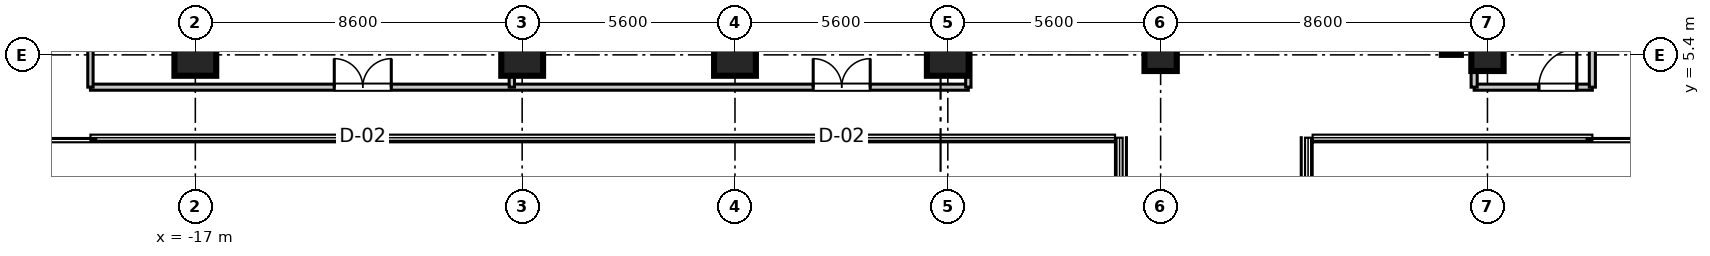
"""IFC4 building model, lengths in metres.
Left out: names, types, materials, properties, quantities, classifications, styles, units other than length and angle.
Written with IfcOpenShell. Run it as: python <this file> out.ifc"""

import sys

from ifc_helpers import new_model, si_unit, direction, frame, frame_2d, origin, origin_2d, place, context, subcontext, project, spatial, rectangle, extrude, source, transform, mapped, element, fill, save


model = new_model("IFC4")
c1 = context("Model", 3, precision=1e-05, world=origin(), true_north=direction((0.0, 1.0)))
c2 = subcontext(c1, "Body", "Model", "MODEL_VIEW")
j1 = project(units=[si_unit("LENGTHUNIT", "METRE"), si_unit("PLANEANGLEUNIT", "RADIAN")], contexts=[c1])
p1 = place(None, origin())
s1 = spatial("IfcSite", under=j1, at=p1, CompositionType="ELEMENT")
p2 = place(p1, origin())
s2 = spatial("IfcBuilding", under=s1, at=p2, CompositionType="ELEMENT")
p3 = place(p2, frame((0.0, 0.0, 170.9)))
s3 = spatial("IfcBuildingStorey", under=s2, at=p3, CompositionType="ELEMENT", Elevation=170.9)
m1 = source(origin(), c2, "Body", "SweptSolid", [
    extrude(rectangle(XDim=1.1, YDim=1.1, at=origin_2d()), origin(), (0.0, 0.0, 1.0), 3.605),
])
for number, where, z_axis, x_axis in (
    (1, (-17.0, 5.4, 0.0), (0.0, 0.0, 1.0), (1.0, 0.0, 0.0)),
    (2, (-8.4, 5.4, 0.0), (0.0, 0.0, 1.0), (1.0, 0.0, 0.0)),
    (3, (-2.8, 5.4, 0.0), (0.0, 0.0, 1.0), (1.0, 0.0, 0.0)),
    (4, (2.8, 5.4, 0.0), (0.0, 0.0, 1.0), (1.0, 0.0, 0.0)),
):
    element("IfcColumn", number, at=place(p3, frame(where, z_axis=z_axis, x_axis=x_axis)), inside=s3, PredefinedType="COLUMN", context=c2, shape_type="MappedRepresentation", body=[
        mapped(m1, transform((0.0, 0.0, 0.0), scale=1.0)),
    ])
m2 = source(origin(), c2, "Body", "SweptSolid", [
    extrude(rectangle(XDim=0.85, YDim=0.85, at=origin_2d()), origin(), (0.0, 0.0, 1.0), 3.605),
])
for number, where, z_axis, x_axis in (
    (5, (8.4, 5.4, 0.0), (0.0, 0.0, 1.0), (1.0, 0.0, 0.0)),
    (6, (17.0, 5.4, 0.0), (0.0, 0.0, 1.0), (1.0, 0.0, 0.0)),
):
    element("IfcColumn", number, at=place(p3, frame(where, z_axis=z_axis, x_axis=x_axis)), inside=s3, PredefinedType="PILASTER", context=c2, shape_type="MappedRepresentation", body=[
        mapped(m2, transform((0.0, 0.0, 0.0), scale=1.0)),
    ])
m3 = source(origin(), c2, "Body", "SweptSolid", [
    extrude(rectangle(XDim=11.6, YDim=0.5, at=frame_2d((5.8, 0.0))), origin(), (0.0, 0.0, 1.0), 3.39),
])
p4 = place(p3, frame((16.05, 5.4, 0.0), z_axis=(0.0, 0.0, 1.0), x_axis=(0.0, 1.0, 0.0)))
e7 = element("IfcWall", 7, at=p4, inside=s3, PredefinedType="SHEAR", context=c2, shape_type="MappedRepresentation", body=[
    mapped(m3, transform((0.0, 0.0, 0.0), scale=1.0)),
])
m4 = source(origin(), c2, "Body", "SweptSolid", [
    extrude(rectangle(XDim=3.11, YDim=0.16, at=frame_2d((1.555, 0.0))), origin(), (0.0, 0.0, 1.0), 2.73),
])
p5 = place(p3, frame((16.65, 4.55, 0.0), z_axis=(0.0, 0.0, 1.0), x_axis=(1.0, 0.0, 0.0)))
e8 = element("IfcWall", 8, at=p5, inside=s3, PredefinedType="PARTITIONING", context=c2, shape_type="MappedRepresentation", body=[
    mapped(m4, transform((0.0, 0.0, 0.0), scale=1.0)),
])
p6 = place(p5, frame((1.701, 0.0, 0.0)))
e9 = element("IfcOpeningElement", 9, at=p6, cuts=e8, PredefinedType="OPENING", context=c2, shape_type="SweptSolid", body=[
    extrude(rectangle(XDim=1.0, YDim=2.1, at=frame_2d((0.5, 1.05))), frame((0.0, 0.09, 0.0), z_axis=(0.0, -1.0, 0.0), x_axis=(1.0, 0.0, 0.0)), (0.0, 0.0, 1.0), 0.18),
])
m5 = source(origin(), c2, "Body", "SweptSolid", [
    extrude(rectangle(XDim=17.95, YDim=0.16, at=frame_2d((8.975, 0.0))), origin(), (0.0, 0.0, 1.0), 2.73),
])
p7 = place(p3, frame((16.65, 4.55, 0.0), z_axis=(0.0, 0.0, 1.0), x_axis=(0.0, 1.0, 0.0)))
e10 = element("IfcWall", 10, at=p7, inside=s3, PredefinedType="PARTITIONING", context=c2, shape_type="MappedRepresentation", body=[
    mapped(m5, transform((0.0, 0.0, 0.0), scale=1.0)),
])
m6 = source(origin(), c2, "Body", "SweptSolid", [
    extrude(rectangle(XDim=16.53, YDim=0.16, at=frame_2d((8.265, 0.0))), origin(), (0.0, 0.0, 1.0), 2.73),
])
p8 = place(p3, frame((19.76, 4.55, 0.0), z_axis=(0.0, 0.0, 1.0), x_axis=(0.0, 1.0, 0.0)))
e11 = element("IfcWall", 11, at=p8, inside=s3, PredefinedType="PARTITIONING", context=c2, shape_type="MappedRepresentation", body=[
    mapped(m6, transform((0.0, 0.0, 0.0), scale=1.0)),
])
m7 = source(origin(), c2, "Body", "SweptSolid", [
    extrude(rectangle(XDim=23.1, YDim=0.16, at=frame_2d((11.55, 0.0))), origin(), (0.0, 0.0, 1.0), 2.73),
])
p9 = place(p3, frame((-19.76, 4.55, 0.0), z_axis=(0.0, 0.0, 1.0), x_axis=(1.0, 0.0, 0.0)))
e12 = element("IfcWall", 12, at=p9, inside=s3, PredefinedType="PARTITIONING", context=c2, shape_type="MappedRepresentation", body=[
    mapped(m7, transform((0.0, 0.0, 0.0), scale=1.0)),
])
p10 = place(p9, frame((6.416, 0.0, 0.0)))
e13 = element("IfcOpeningElement", 13, at=p10, cuts=e12, PredefinedType="OPENING", context=c2, shape_type="SweptSolid", body=[
    extrude(rectangle(XDim=1.5, YDim=2.15, at=frame_2d((0.75, 1.075))), frame((0.0, 0.09, 0.0), z_axis=(0.0, -1.0, 0.0), x_axis=(1.0, 0.0, 0.0)), (0.0, 0.0, 1.0), 0.18),
])
p11 = place(p9, frame((19.018, 0.0, 0.0)))
e14 = element("IfcOpeningElement", 14, at=p11, cuts=e12, PredefinedType="OPENING", context=c2, shape_type="SweptSolid", body=[
    extrude(rectangle(XDim=1.5, YDim=2.15, at=frame_2d((0.75, 1.075))), frame((0.0, 0.09, 0.0), z_axis=(0.0, -1.0, 0.0), x_axis=(1.0, 0.0, 0.0)), (0.0, 0.0, 1.0), 0.18),
])
m8 = source(origin(), c2, "Body", "SweptSolid", [
    extrude(rectangle(XDim=16.53, YDim=0.14, at=frame_2d((8.265, 0.0))), origin(), (0.0, 0.0, 1.0), 2.73),
])
p12 = place(p3, frame((-19.76, 4.55, 0.0), z_axis=(0.0, 0.0, 1.0), x_axis=(0.0, 1.0, 0.0)))
e15 = element("IfcWall", 15, at=p12, inside=s3, PredefinedType="PARTITIONING", context=c2, shape_type="MappedRepresentation", body=[
    mapped(m8, transform((0.0, 0.0, 0.0), scale=1.0)),
])
m9 = source(origin(), c2, "Body", "SweptSolid", [
    extrude(rectangle(XDim=17.95, YDim=0.14, at=frame_2d((8.975, 0.0))), origin(), (0.0, 0.0, 1.0), 2.73),
])
for number, where, z_axis, x_axis in (
    (16, (3.34, 4.55, 0.0), (0.0, 0.0, 1.0), (0.0, 1.0, 0.0)),
    (17, (-8.672, 4.55, 0.0), (0.0, 0.0, 1.0), (0.0, 1.0, 0.0)),
):
    element("IfcWall", number, at=place(p3, frame(where, z_axis=z_axis, x_axis=x_axis)), inside=s3, PredefinedType="PARTITIONING", context=c2, shape_type="MappedRepresentation", body=[
        mapped(m9, transform((0.0, 0.0, 0.0), scale=1.0)),
    ])
m10 = source(origin(), c2, "Body", "SweptSolid", [
    extrude(rectangle(XDim=1.0, YDim=2.1, at=frame_2d((0.5, 1.05))), frame((0.0, 0.025, 0.0), z_axis=(0.0, -1.0, 0.0), x_axis=(1.0, 0.0, 0.0)), (0.0, 0.0, 1.0), 0.05),
])
p13 = place(p6, origin())
e18 = element("IfcDoor", 18, at=p13, inside=s3, OperationType="SINGLE_SWING_RIGHT", PredefinedType="DOOR", context=c2, shape_type="MappedRepresentation", body=[
    mapped(m10, transform((0.0, 0.0, 0.0), scale=1.0)),
])
fill(e9, e18)
m11 = source(origin(), c2, "Body", "SweptSolid", [
    extrude(rectangle(XDim=1.5, YDim=2.15, at=frame_2d((0.75, 1.075))), frame((0.0, 0.025, 0.0), z_axis=(0.0, -1.0, 0.0), x_axis=(1.0, 0.0, 0.0)), (0.0, 0.0, 1.0), 0.05),
])
p14 = place(p10, origin())
e19 = element("IfcDoor", 19, at=p14, inside=s3, OperationType="DOUBLE_DOOR_SINGLE_SWING", PredefinedType="DOOR", context=c2, shape_type="MappedRepresentation", body=[
    mapped(m11, transform((0.0, 0.0, 0.0), scale=1.0)),
])
fill(e13, e19)
p15 = place(p11, origin())
e20 = element("IfcDoor", 20, at=p15, inside=s3, OperationType="DOUBLE_DOOR_SINGLE_SWING", PredefinedType="DOOR", context=c2, shape_type="MappedRepresentation", body=[
    mapped(m11, transform((0.0, 0.0, 0.0), scale=1.0)),
])
fill(e14, e20)
save(model, sys.argv[1])
